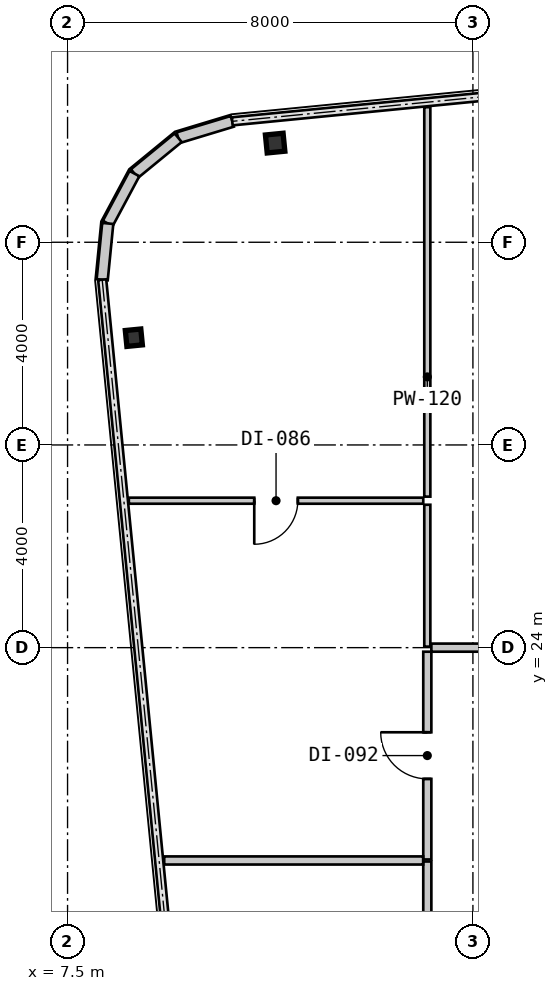
"""IFC4 building model, lengths in metres.
Left out: names, types, materials, properties, quantities, classifications, styles, units other than length and angle.
Written with IfcOpenShell. Run it as: python <this file> out.ifc"""

import sys

from ifc_helpers import new_model, si_unit, direction, frame, frame_2d, origin, origin_2d, place, context, subcontext, project, spatial, rectangle, i_section, extrude, source, transform, mapped, element, fill, save


model = new_model("IFC4")
c1 = context("Model", 3, precision=1e-05, world=origin(), true_north=direction((0.0, 1.0)))
c2 = subcontext(c1, "Body", "Model", "MODEL_VIEW")
j1 = project(units=[si_unit("LENGTHUNIT", "METRE"), si_unit("PLANEANGLEUNIT", "RADIAN")], contexts=[c1])
p1 = place(None, origin())
s1 = spatial("IfcSite", under=j1, at=p1, CompositionType="ELEMENT")
p2 = place(p1, origin())
s2 = spatial("IfcBuilding", under=s1, at=p2, CompositionType="ELEMENT")
p3 = place(p2, frame((0.0, 0.0, 99.75)))
s3 = spatial("IfcBuildingStorey", under=s2, at=p3, CompositionType="ELEMENT", Elevation=99.75)
m1 = source(origin(), c2, "Body", "SweptSolid", [
    extrude(i_section(OverallWidth=0.35, OverallDepth=0.356, WebThickness=0.018, FlangeThickness=0.028, at=origin_2d()), origin(), (0.0, 0.0, 1.0), 3.15),
])
p4 = place(p3, frame((11.597, 33.957, 0.0), z_axis=(0.0, 0.0, 1.0), x_axis=(0.995227399982, 0.097582899759, 0.0)))
e1 = element("IfcColumn", 1, at=p4, inside=s3, PredefinedType="COLUMN", context=c2, shape_type="MappedRepresentation", body=[
    mapped(m1, transform((0.0, 0.0, 0.0), scale=1.0)),
])
m2 = source(origin(), c2, "Body", "SweptSolid", [
    extrude(i_section(OverallWidth=0.307, OverallDepth=0.315, WebThickness=0.012, FlangeThickness=0.019, at=origin_2d()), origin(), (0.0, 0.0, 1.0), 3.15),
])
p5 = place(p3, frame((8.808, 30.116, 0.0), z_axis=(0.0, 0.0, 1.0), x_axis=(0.995227399982, 0.097582899759, 0.0)))
e2 = element("IfcColumn", 2, at=p5, inside=s3, PredefinedType="COLUMN", context=c2, shape_type="MappedRepresentation", body=[
    mapped(m2, transform((0.0, 0.0, 0.0), scale=1.0)),
])
m3 = source(origin(), c2, "Body", "SweptSolid", [
    extrude(rectangle(XDim=1.116, YDim=0.22, at=frame_2d((0.558, 0.0))), origin(), (0.0, 0.0, 1.0), 2.93),
])
p6 = place(p3, frame((10.751, 34.386, 0.0), z_axis=(0.0, 0.0, 1.0), x_axis=(-0.957070388811, -0.289855603468, 0.0)))
e3 = element("IfcWall", 3, at=p6, inside=s3, PredefinedType="SOLIDWALL", context=c2, shape_type="MappedRepresentation", body=[
    mapped(m3, transform((0.0, 0.0, 0.0), scale=1.0)),
])
m4 = source(origin(), c2, "Body", "SweptSolid", [
    extrude(rectangle(XDim=1.116, YDim=0.22, at=frame_2d((0.558, 0.0))), origin(), (0.0, 0.0, 1.0), 2.93),
])
p7 = place(p3, frame((9.683, 34.063, 0.0), z_axis=(0.0, 0.0, 1.0), x_axis=(-0.773254916409, -0.634095287989, 0.0)))
e4 = element("IfcWall", 4, at=p7, inside=s3, PredefinedType="SOLIDWALL", context=c2, shape_type="MappedRepresentation", body=[
    mapped(m4, transform((0.0, 0.0, 0.0), scale=1.0)),
])
m5 = source(origin(), c2, "Body", "SweptSolid", [
    extrude(rectangle(XDim=1.116, YDim=0.22, at=frame_2d((0.558, 0.0))), origin(), (0.0, 0.0, 1.0), 2.93),
])
p8 = place(p3, frame((8.82, 33.355, 0.0), z_axis=(0.0, 0.0, 1.0), x_axis=(-0.471802540493, -0.881704237704, 0.0)))
e5 = element("IfcWall", 5, at=p8, inside=s3, PredefinedType="SOLIDWALL", context=c2, shape_type="MappedRepresentation", body=[
    mapped(m5, transform((0.0, 0.0, 0.0), scale=1.0)),
])
p9 = place(p3, frame((8.293, 32.371, 0.0), z_axis=(0.0, 0.0, 1.0), x_axis=(-0.098463783145, -0.99514063499, 0.0)))
e6 = element("IfcWall", 6, at=p9, inside=s3, PredefinedType="SOLIDWALL", context=c2, shape_type="MappedRepresentation", body=[
    mapped(m4, transform((0.0, 0.0, 0.0), scale=1.0)),
])
m6 = source(origin(), c2, "Body", "SweptSolid", [
    extrude(rectangle(XDim=2.385, YDim=0.16, at=frame_2d((1.192, 0.0))), origin(), (0.0, 0.0, 1.0), 2.93),
])
p10 = place(p3, frame((14.6, 17.395, 0.0), z_axis=(0.0, 0.0, 1.0), x_axis=(0.0, 1.0, 0.0)))
e7 = element("IfcWall", 7, at=p10, inside=s3, PredefinedType="PARTITIONING", context=c2, shape_type="MappedRepresentation", body=[
    mapped(m6, transform((0.0, 0.0, 0.0), scale=1.0)),
])
m7 = source(origin(), c2, "Body", "SweptSolid", [
    extrude(rectangle(XDim=4.1, YDim=0.16, at=frame_2d((2.05, 0.0))), origin(), (0.0, 0.0, 1.0), 2.93),
])
p11 = place(p3, frame((14.6, 19.82, 0.0), z_axis=(0.0, 0.0, 1.0), x_axis=(0.0, 1.0, 0.0)))
e8 = element("IfcWall", 8, at=p11, inside=s3, PredefinedType="PARTITIONING", context=c2, shape_type="MappedRepresentation", body=[
    mapped(m7, transform((0.0, 0.0, 0.0), scale=1.0)),
])
m8 = source(origin(), c2, "Body", "SweptSolid", [
    extrude(rectangle(XDim=0.92, YDim=2.1, at=frame_2d((0.46, 1.05))), frame((0.0, 0.09, 0.0), z_axis=(0.0, -1.0, 0.0), x_axis=(1.0, 0.0, 0.0)), (0.0, 0.0, 1.0), 0.18),
])
p12 = place(p11, frame((1.59, 0.0, 0.0)))
e9 = element("IfcOpeningElement", 9, at=p12, cuts=e8, PredefinedType="OPENING", context=c2, shape_type="MappedRepresentation", body=[
    mapped(m8, transform((0.0, 0.0, 0.0), scale=1.0)),
])
m9 = source(origin(), c2, "Body", "SweptSolid", [
    extrude(rectangle(XDim=4.17, YDim=0.16, at=frame_2d((2.085, 0.0))), origin(), (0.0, 0.0, 1.0), 2.93),
])
p13 = place(p3, frame((14.68, 24.0, 0.0), z_axis=(0.0, 0.0, 1.0), x_axis=(1.0, 0.0, 0.0)))
e10 = element("IfcWall", 10, at=p13, inside=s3, PredefinedType="PARTITIONING", context=c2, shape_type="MappedRepresentation", body=[
    mapped(m9, transform((0.0, 0.0, 0.0), scale=1.0)),
])
p14 = place(p13, frame((1.69, 0.0, 0.0)))
e11 = element("IfcOpeningElement", 11, at=p14, cuts=e10, PredefinedType="OPENING", context=c2, shape_type="MappedRepresentation", body=[
    mapped(m8, transform((0.0, 0.0, 0.0), scale=1.0)),
])
m10 = source(origin(), c2, "Body", "SweptSolid", [
    extrude(rectangle(XDim=5.11, YDim=0.16, at=frame_2d((2.555, 0.0))), origin(), (0.0, 0.0, 1.0), 2.93),
])
p15 = place(p3, frame((9.408, 19.8, 0.0), z_axis=(0.0, 0.0, 1.0), x_axis=(1.0, 0.0, 0.0)))
e12 = element("IfcWall", 12, at=p15, inside=s3, PredefinedType="PARTITIONING", context=c2, shape_type="MappedRepresentation", body=[
    mapped(m10, transform((0.0, 0.0, 0.0), scale=1.0)),
])
m11 = source(origin(), c2, "Body", "SweptSolid", [
    extrude(rectangle(XDim=5.811, YDim=0.12, at=frame_2d((2.905, 0.0))), origin(), (0.0, 0.0, 1.0), 2.93),
])
p16 = place(p3, frame((8.709, 26.9, 0.0), z_axis=(0.0, 0.0, 1.0), x_axis=(1.0, 0.0, 0.0)))
e13 = element("IfcWall", 13, at=p16, inside=s3, PredefinedType="PARTITIONING", context=c2, shape_type="MappedRepresentation", body=[
    mapped(m11, transform((0.0, 0.0, 0.0), scale=1.0)),
])
m12 = source(origin(), c2, "Body", "SweptSolid", [
    extrude(rectangle(XDim=0.86, YDim=2.1, at=frame_2d((0.43, 1.05))), frame((0.0, 0.07, 0.0), z_axis=(0.0, -1.0, 0.0), x_axis=(1.0, 0.0, 0.0)), (0.0, 0.0, 1.0), 0.14),
])
p17 = place(p16, frame((2.475, 0.0, 0.0)))
e14 = element("IfcOpeningElement", 14, at=p17, cuts=e13, PredefinedType="OPENING", context=c2, shape_type="MappedRepresentation", body=[
    mapped(m12, transform((0.0, 0.0, 0.0), scale=1.0)),
])
m13 = source(origin(), c2, "Body", "SweptSolid", [
    extrude(rectangle(XDim=2.8, YDim=0.12, at=frame_2d((1.4, 0.0))), origin(), (0.0, 0.0, 1.0), 2.93),
])
p18 = place(p3, frame((14.6, 26.82, 0.0), z_axis=(0.0, 0.0, 1.0), x_axis=(0.0, -1.0, 0.0)))
e15 = element("IfcWall", 15, at=p18, inside=s3, PredefinedType="PARTITIONING", context=c2, shape_type="MappedRepresentation", body=[
    mapped(m13, transform((0.0, 0.0, 0.0), scale=1.0)),
])
m14 = source(origin(), c2, "Body", "SweptSolid", [
    extrude(rectangle(XDim=7.686, YDim=0.12, at=frame_2d((3.843, 0.0))), origin(), (0.0, 0.0, 1.0), 2.93),
])
p19 = place(p3, frame((14.6, 34.666, 0.0), z_axis=(0.0, 0.0, 1.0), x_axis=(0.0, -1.0, 0.0)))
e16 = element("IfcWall", 16, at=p19, inside=s3, PredefinedType="PARTITIONING", context=c2, shape_type="MappedRepresentation", body=[
    mapped(m14, transform((0.0, 0.0, 0.0), scale=1.0)),
])
m15 = source(origin(), c2, "Body", "SweptSolid", [
    extrude(rectangle(XDim=0.92, YDim=2.1, at=frame_2d((0.46, 1.05))), frame((0.0, 0.025, 0.0), z_axis=(0.0, -1.0, 0.0), x_axis=(1.0, 0.0, 0.0)), (0.0, 0.0, 1.0), 0.05),
])
p20 = place(p12, origin())
e17 = element("IfcDoor", 17, at=p20, inside=s3, OperationType="SINGLE_SWING_RIGHT", PredefinedType="DOOR", context=c2, shape_type="MappedRepresentation", body=[
    mapped(m15, transform((0.0, 0.0, 0.0), scale=1.0)),
])
fill(e9, e17)
m16 = source(origin(), c2, "Body", "SweptSolid", [
    extrude(rectangle(XDim=0.86, YDim=2.1, at=frame_2d((0.43, 1.05))), frame((0.0, 0.025, 0.0), z_axis=(0.0, -1.0, 0.0), x_axis=(1.0, 0.0, 0.0)), (0.0, 0.0, 1.0), 0.05),
])
p21 = place(p17, frame((0.86, 0.0, 0.0), z_axis=(0.0, 0.0, 1.0), x_axis=(-1.0, 0.0, 0.0)))
e18 = element("IfcDoor", 18, at=p21, inside=s3, OperationType="SINGLE_SWING_RIGHT", PredefinedType="DOOR", context=c2, shape_type="MappedRepresentation", body=[
    mapped(m16, transform((0.0, 0.0, 0.0), scale=1.0)),
])
fill(e14, e18)
save(model, sys.argv[1])
